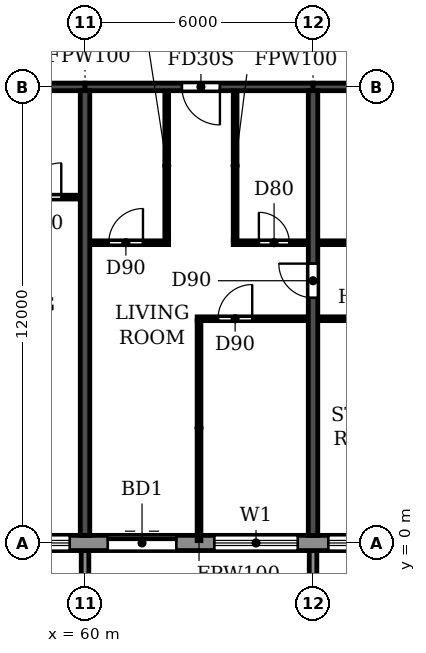
"""IFC4 building model, lengths in metres.
Left out: names, types, materials, properties, quantities, classifications, styles, units other than length and angle.
Written with IfcOpenShell. Run it as: python <this file> out.ifc"""

import sys

from ifc_helpers import new_model, si_unit, direction, frame, frame_2d, origin, place, context, subcontext, project, spatial, polyline, rectangle, outline, extrude, source, transform, mapped, element, fill, save


model = new_model("IFC4")
c1 = context("Model", 3, precision=1e-05, world=origin(), true_north=direction((0.0, 1.0)))
c2 = subcontext(c1, "Body", "Model", "MODEL_VIEW")
j1 = project(units=[si_unit("LENGTHUNIT", "METRE"), si_unit("PLANEANGLEUNIT", "RADIAN")], contexts=[c1])
p1 = place(None, origin())
s1 = spatial("IfcSite", under=j1, at=p1, CompositionType="ELEMENT")
p2 = place(p1, origin())
s2 = spatial("IfcBuilding", under=s1, at=p2, CompositionType="ELEMENT")
p3 = place(p2, frame((0.0, 0.0, 181.8)))
s3 = spatial("IfcBuildingStorey", under=s2, at=p3, CompositionType="ELEMENT", Elevation=181.8)
p4 = place(p3, frame((60.0, 0.2, 0.0), z_axis=(0.0, 0.0, 1.0), x_axis=(0.0, 1.0, 0.0)))
e1 = element("IfcWall", 1, at=p4, inside=s3, PredefinedType="SHEAR", context=c2, shape_type="SweptSolid", body=[
    extrude(rectangle(XDim=11.7, YDim=0.25, at=frame_2d((5.85, 0.0))), origin(), (0.0, 0.0, 1.0), 3.08),
])
p5 = place(p3, frame((66.0, 0.2, 0.0), z_axis=(0.0, 0.0, 1.0), x_axis=(0.0, 1.0, 0.0)))
e2 = element("IfcWall", 2, at=p5, inside=s3, PredefinedType="SHEAR", context=c2, shape_type="SweptSolid", body=[
    extrude(rectangle(XDim=11.7, YDim=0.25, at=frame_2d((5.85, 0.0))), origin(), (0.0, 0.0, 1.0), 3.08),
])
p6 = place(p5, frame((6.25, 0.0, 0.0)))
e3 = element("IfcOpeningElement", 3, at=p6, cuts=e2, PredefinedType="OPENING", context=c2, shape_type="SweptSolid", body=[
    extrude(rectangle(XDim=0.9, YDim=2.1, at=frame_2d((0.45, 1.05))), frame((0.0, 0.135, 0.0), z_axis=(0.0, -1.0, 0.0), x_axis=(1.0, 0.0, 0.0)), (0.0, 0.0, 1.0), 0.27),
])
p7 = place(p3, frame((54.0, 12.0, 0.0), z_axis=(0.0, 0.0, 1.0), x_axis=(1.0, 0.0, 0.0)))
e4 = element("IfcWall", 4, at=p7, inside=s3, PredefinedType="SHEAR", context=c2, shape_type="SweptSolid", body=[
    extrude(rectangle(XDim=6.0, YDim=0.2, at=frame_2d((3.0, 0.0))), origin(), (0.0, 0.0, 1.0), 2.48),
])
p8 = place(p7, frame((2.45, 0.0, 0.0)))
e5 = element("IfcOpeningElement", 5, at=p8, cuts=e4, PredefinedType="OPENING", context=c2, shape_type="SweptSolid", body=[
    extrude(rectangle(XDim=1.0, YDim=2.1, at=frame_2d((0.5, 1.05))), frame((0.0, 0.11, 0.0), z_axis=(0.0, -1.0, 0.0), x_axis=(1.0, 0.0, 0.0)), (0.0, 0.0, 1.0), 0.22),
])
p9 = place(p3, frame((60.0, 12.0, 0.0), z_axis=(0.0, 0.0, 1.0), x_axis=(1.0, 0.0, 0.0)))
e6 = element("IfcWall", 6, at=p9, inside=s3, PredefinedType="SHEAR", context=c2, shape_type="SweptSolid", body=[
    extrude(rectangle(XDim=6.0, YDim=0.2, at=frame_2d((3.0, 0.0))), origin(), (0.0, 0.0, 1.0), 2.48),
])
p10 = place(p9, frame((2.55, 0.0, 0.0)))
e7 = element("IfcOpeningElement", 7, at=p10, cuts=e6, PredefinedType="OPENING", context=c2, shape_type="SweptSolid", body=[
    extrude(rectangle(XDim=1.0, YDim=2.1, at=frame_2d((0.5, 1.05))), frame((0.0, 0.11, 0.0), z_axis=(0.0, -1.0, 0.0), x_axis=(1.0, 0.0, 0.0)), (0.0, 0.0, 1.0), 0.22),
])
p11 = place(p3, frame((66.0, 12.0, 0.0), z_axis=(0.0, 0.0, 1.0), x_axis=(1.0, 0.0, 0.0)))
e8 = element("IfcWall", 8, at=p11, inside=s3, PredefinedType="SHEAR", context=c2, shape_type="SweptSolid", body=[
    extrude(rectangle(XDim=6.0, YDim=0.2, at=frame_2d((3.0, 0.0))), origin(), (0.0, 0.0, 1.0), 2.48),
])
p12 = place(p3, frame((22.683, 0.0, 0.0), z_axis=(0.0, 0.0, 1.0), x_axis=(1.0, 0.0, 0.0)))
e9 = element("IfcWall", 9, at=p12, inside=s3, PredefinedType="STANDARD", context=c2, shape_type="SweptSolid", body=[
    extrude(rectangle(XDim=56.634, YDim=0.4, at=frame_2d((28.317, 0.0))), origin(), (0.0, 0.0, 1.0), 3.08),
])
p13 = place(p12, frame((1.717, 0.0, 0.9)))
e10 = element("IfcOpeningElement", 10, at=p13, cuts=e9, PredefinedType="OPENING", context=c2, shape_type="SweptSolid", body=[
    extrude(rectangle(XDim=2.2, YDim=1.5, at=frame_2d((1.1, 0.75))), frame((0.0, 0.21, 0.0), z_axis=(0.0, -1.0, 0.0), x_axis=(1.0, 0.0, 0.0)), (0.0, 0.0, 1.0), 0.42),
])
p14 = place(p12, frame((4.917, 0.0, 0.0)))
e11 = element("IfcOpeningElement", 11, at=p14, cuts=e9, PredefinedType="OPENING", context=c2, shape_type="SweptSolid", body=[
    extrude(rectangle(XDim=1.8, YDim=2.4, at=frame_2d((0.9, 1.2))), frame((0.0, 0.21, 0.0), z_axis=(0.0, -1.0, 0.0), x_axis=(1.0, 0.0, 0.0)), (0.0, 0.0, 1.0), 0.42),
])
p15 = place(p12, frame((7.717, 0.0, 0.9)))
e12 = element("IfcOpeningElement", 12, at=p15, cuts=e9, PredefinedType="OPENING", context=c2, shape_type="SweptSolid", body=[
    extrude(rectangle(XDim=2.2, YDim=1.5, at=frame_2d((1.1, 0.75))), frame((0.0, 0.21, 0.0), z_axis=(0.0, -1.0, 0.0), x_axis=(1.0, 0.0, 0.0)), (0.0, 0.0, 1.0), 0.42),
])
p16 = place(p12, frame((10.717, 0.0, 0.9)))
e13 = element("IfcOpeningElement", 13, at=p16, cuts=e9, PredefinedType="OPENING", context=c2, shape_type="SweptSolid", body=[
    extrude(rectangle(XDim=2.2, YDim=1.5, at=frame_2d((1.1, 0.75))), frame((0.0, 0.21, 0.0), z_axis=(0.0, -1.0, 0.0), x_axis=(1.0, 0.0, 0.0)), (0.0, 0.0, 1.0), 0.42),
])
p17 = place(p12, frame((13.717, 0.0, 0.9)))
e14 = element("IfcOpeningElement", 14, at=p17, cuts=e9, PredefinedType="OPENING", context=c2, shape_type="SweptSolid", body=[
    extrude(rectangle(XDim=2.2, YDim=1.5, at=frame_2d((1.1, 0.75))), frame((0.0, 0.21, 0.0), z_axis=(0.0, -1.0, 0.0), x_axis=(1.0, 0.0, 0.0)), (0.0, 0.0, 1.0), 0.42),
])
p18 = place(p12, frame((16.717, 0.0, 0.9)))
e15 = element("IfcOpeningElement", 15, at=p18, cuts=e9, PredefinedType="OPENING", context=c2, shape_type="SweptSolid", body=[
    extrude(rectangle(XDim=2.2, YDim=1.5, at=frame_2d((1.1, 0.75))), frame((0.0, 0.21, 0.0), z_axis=(0.0, -1.0, 0.0), x_axis=(1.0, 0.0, 0.0)), (0.0, 0.0, 1.0), 0.42),
])
p19 = place(p12, frame((19.717, 0.0, 0.9)))
e16 = element("IfcOpeningElement", 16, at=p19, cuts=e9, PredefinedType="OPENING", context=c2, shape_type="SweptSolid", body=[
    extrude(rectangle(XDim=2.2, YDim=1.5, at=frame_2d((1.1, 0.75))), frame((0.0, 0.21, 0.0), z_axis=(0.0, -1.0, 0.0), x_axis=(1.0, 0.0, 0.0)), (0.0, 0.0, 1.0), 0.42),
])
p20 = place(p12, frame((22.717, 0.0, 0.9)))
e17 = element("IfcOpeningElement", 17, at=p20, cuts=e9, PredefinedType="OPENING", context=c2, shape_type="SweptSolid", body=[
    extrude(rectangle(XDim=2.2, YDim=1.5, at=frame_2d((1.1, 0.75))), frame((0.0, 0.21, 0.0), z_axis=(0.0, -1.0, 0.0), x_axis=(1.0, 0.0, 0.0)), (0.0, 0.0, 1.0), 0.42),
])
p21 = place(p12, frame((25.717, 0.0, 0.9)))
e18 = element("IfcOpeningElement", 18, at=p21, cuts=e9, PredefinedType="OPENING", context=c2, shape_type="SweptSolid", body=[
    extrude(rectangle(XDim=2.2, YDim=1.5, at=frame_2d((1.1, 0.75))), frame((0.0, 0.21, 0.0), z_axis=(0.0, -1.0, 0.0), x_axis=(1.0, 0.0, 0.0)), (0.0, 0.0, 1.0), 0.42),
])
p22 = place(p12, frame((28.717, 0.0, 0.9)))
e19 = element("IfcOpeningElement", 19, at=p22, cuts=e9, PredefinedType="OPENING", context=c2, shape_type="SweptSolid", body=[
    extrude(rectangle(XDim=2.2, YDim=1.5, at=frame_2d((1.1, 0.75))), frame((0.0, 0.21, 0.0), z_axis=(0.0, -1.0, 0.0), x_axis=(1.0, 0.0, 0.0)), (0.0, 0.0, 1.0), 0.42),
])
p23 = place(p12, frame((31.717, 0.0, 0.9)))
e20 = element("IfcOpeningElement", 20, at=p23, cuts=e9, PredefinedType="OPENING", context=c2, shape_type="SweptSolid", body=[
    extrude(rectangle(XDim=2.2, YDim=1.5, at=frame_2d((1.1, 0.75))), frame((0.0, 0.21, 0.0), z_axis=(0.0, -1.0, 0.0), x_axis=(1.0, 0.0, 0.0)), (0.0, 0.0, 1.0), 0.42),
])
p24 = place(p12, frame((34.717, 0.0, 0.9)))
e21 = element("IfcOpeningElement", 21, at=p24, cuts=e9, PredefinedType="OPENING", context=c2, shape_type="SweptSolid", body=[
    extrude(rectangle(XDim=2.2, YDim=1.5, at=frame_2d((1.1, 0.75))), frame((0.0, 0.21, 0.0), z_axis=(0.0, -1.0, 0.0), x_axis=(1.0, 0.0, 0.0)), (0.0, 0.0, 1.0), 0.42),
])
p25 = place(p12, frame((37.917, 0.0, 0.0)))
e22 = element("IfcOpeningElement", 22, at=p25, cuts=e9, PredefinedType="OPENING", context=c2, shape_type="SweptSolid", body=[
    extrude(rectangle(XDim=1.8, YDim=2.4, at=frame_2d((0.9, 1.2))), frame((0.0, 0.21, 0.0), z_axis=(0.0, -1.0, 0.0), x_axis=(1.0, 0.0, 0.0)), (0.0, 0.0, 1.0), 0.42),
])
p26 = place(p12, frame((40.717, 0.0, 0.9)))
e23 = element("IfcOpeningElement", 23, at=p26, cuts=e9, PredefinedType="OPENING", context=c2, shape_type="SweptSolid", body=[
    extrude(rectangle(XDim=2.2, YDim=1.5, at=frame_2d((1.1, 0.75))), frame((0.0, 0.21, 0.0), z_axis=(0.0, -1.0, 0.0), x_axis=(1.0, 0.0, 0.0)), (0.0, 0.0, 1.0), 0.42),
])
p27 = place(p12, frame((43.717, 0.0, 0.9)))
e24 = element("IfcOpeningElement", 24, at=p27, cuts=e9, PredefinedType="OPENING", context=c2, shape_type="SweptSolid", body=[
    extrude(rectangle(XDim=2.2, YDim=1.5, at=frame_2d((1.1, 0.75))), frame((0.0, 0.21, 0.0), z_axis=(0.0, -1.0, 0.0), x_axis=(1.0, 0.0, 0.0)), (0.0, 0.0, 1.0), 0.42),
])
p28 = place(p12, frame((46.717, 0.0, 0.9)))
e25 = element("IfcOpeningElement", 25, at=p28, cuts=e9, PredefinedType="OPENING", context=c2, shape_type="SweptSolid", body=[
    extrude(rectangle(XDim=2.2, YDim=1.5, at=frame_2d((1.1, 0.75))), frame((0.0, 0.21, 0.0), z_axis=(0.0, -1.0, 0.0), x_axis=(1.0, 0.0, 0.0)), (0.0, 0.0, 1.0), 0.42),
])
p29 = place(p12, frame((49.917, 0.0, 0.0)))
e26 = element("IfcOpeningElement", 26, at=p29, cuts=e9, PredefinedType="OPENING", context=c2, shape_type="SweptSolid", body=[
    extrude(rectangle(XDim=1.8, YDim=2.4, at=frame_2d((0.9, 1.2))), frame((0.0, 0.21, 0.0), z_axis=(0.0, -1.0, 0.0), x_axis=(1.0, 0.0, 0.0)), (0.0, 0.0, 1.0), 0.42),
])
p30 = place(p12, frame((52.717, 0.0, 0.9)))
e27 = element("IfcOpeningElement", 27, at=p30, cuts=e9, PredefinedType="OPENING", context=c2, shape_type="SweptSolid", body=[
    extrude(rectangle(XDim=2.2, YDim=1.5, at=frame_2d((1.1, 0.75))), frame((0.0, 0.21, 0.0), z_axis=(0.0, -1.0, 0.0), x_axis=(1.0, 0.0, 0.0)), (0.0, 0.0, 1.0), 0.42),
])
m1 = source(origin(), c2, "Body", "SweptSolid", [
    extrude(outline(polyline([(0.0, 0.0), (0.2, 0.0), (0.2, 1.65), (0.0, 1.65), (0.0, 0.0)])), origin(), (0.0, 0.0, 1.0), 3.1),
])
for number, where in (
    (28, (59.9, -1.85, 0.0)),
    (29, (65.9, -1.85, 0.0)),
):
    element("IfcWall", number, at=place(p3, frame(where)), inside=s3, PredefinedType="STANDARD", context=c2, shape_type="MappedRepresentation", body=[
        mapped(m1, transform((0.0, 0.0, 0.0))),
    ])
p31 = place(p3, frame((62.95, 5.9, 0.0), z_axis=(0.0, 0.0, 1.0), x_axis=(1.0, 0.0, 0.0)))
e30 = element("IfcWall", 30, at=p31, inside=s3, PredefinedType="PARTITIONING", context=c2, shape_type="SweptSolid", body=[
    extrude(rectangle(XDim=2.915, YDim=0.1, at=frame_2d((1.458, 0.0))), origin(), (0.0, 0.0, 1.0), 3.08),
])
p32 = place(p31, frame((0.55, 0.0, 0.0)))
e31 = element("IfcOpeningElement", 31, at=p32, cuts=e30, PredefinedType="OPENING", context=c2, shape_type="SweptSolid", body=[
    extrude(rectangle(XDim=0.9, YDim=2.1, at=frame_2d((0.45, 1.05))), frame((0.0, 0.06, 0.0), z_axis=(0.0, -1.0, 0.0), x_axis=(1.0, 0.0, 0.0)), (0.0, 0.0, 1.0), 0.12),
])
p33 = place(p3, frame((66.135, 5.9, 0.0), z_axis=(0.0, 0.0, 1.0), x_axis=(1.0, 0.0, 0.0)))
e32 = element("IfcWall", 32, at=p33, inside=s3, PredefinedType="PARTITIONING", context=c2, shape_type="SweptSolid", body=[
    extrude(rectangle(XDim=2.765, YDim=0.1, at=frame_2d((1.382, 0.0))), origin(), (0.0, 0.0, 1.0), 3.08),
])
p34 = place(p33, frame((1.465, 0.0, 0.0)))
e33 = element("IfcOpeningElement", 33, at=p34, cuts=e32, PredefinedType="OPENING", context=c2, shape_type="SweptSolid", body=[
    extrude(rectangle(XDim=0.9, YDim=2.1, at=frame_2d((0.45, 1.05))), frame((0.0, 0.06, 0.0), z_axis=(0.0, -1.0, 0.0), x_axis=(1.0, 0.0, 0.0)), (0.0, 0.0, 1.0), 0.12),
])
p35 = place(p3, frame((60.135, 7.9, 0.0), z_axis=(0.0, 0.0, 1.0), x_axis=(1.0, 0.0, 0.0)))
e34 = element("IfcWall", 34, at=p35, inside=s3, PredefinedType="PARTITIONING", context=c2, shape_type="SweptSolid", body=[
    extrude(rectangle(XDim=2.065, YDim=0.1, at=frame_2d((1.032, 0.0))), origin(), (0.0, 0.0, 1.0), 3.08),
])
p36 = place(p35, frame((0.49, 0.0, 0.0)))
e35 = element("IfcOpeningElement", 35, at=p36, cuts=e34, PredefinedType="OPENING", context=c2, shape_type="SweptSolid", body=[
    extrude(rectangle(XDim=0.9, YDim=2.1, at=frame_2d((0.45, 1.05))), frame((0.0, 0.06, 0.0), z_axis=(0.0, -1.0, 0.0), x_axis=(1.0, 0.0, 0.0)), (0.0, 0.0, 1.0), 0.12),
])
p37 = place(p3, frame((63.9, 7.9, 0.0), z_axis=(0.0, 0.0, 1.0), x_axis=(1.0, 0.0, 0.0)))
e36 = element("IfcWall", 36, at=p37, inside=s3, PredefinedType="PARTITIONING", context=c2, shape_type="SweptSolid", body=[
    extrude(rectangle(XDim=1.965, YDim=0.1, at=frame_2d((0.982, 0.0))), origin(), (0.0, 0.0, 1.0), 3.08),
])
p38 = place(p37, frame((0.675, 0.0, 0.0)))
e37 = element("IfcOpeningElement", 37, at=p38, cuts=e36, PredefinedType="OPENING", context=c2, shape_type="SweptSolid", body=[
    extrude(rectangle(XDim=0.8, YDim=2.1, at=frame_2d((0.4, 1.05))), frame((0.0, 0.06, 0.0), z_axis=(0.0, -1.0, 0.0), x_axis=(1.0, 0.0, 0.0)), (0.0, 0.0, 1.0), 0.12),
])
p39 = place(p3, frame((66.135, 7.9, 0.0), z_axis=(0.0, 0.0, 1.0), x_axis=(1.0, 0.0, 0.0)))
e38 = element("IfcWall", 38, at=p39, inside=s3, PredefinedType="PARTITIONING", context=c2, shape_type="SweptSolid", body=[
    extrude(rectangle(XDim=2.965, YDim=0.1, at=frame_2d((1.482, 0.0))), origin(), (0.0, 0.0, 1.0), 3.08),
])
p40 = place(p39, frame((0.965, 0.0, 0.0)))
e39 = element("IfcOpeningElement", 39, at=p40, cuts=e38, PredefinedType="OPENING", context=c2, shape_type="SweptSolid", body=[
    extrude(rectangle(XDim=0.8, YDim=2.1, at=frame_2d((0.4, 1.05))), frame((0.0, 0.06, 0.0), z_axis=(0.0, -1.0, 0.0), x_axis=(1.0, 0.0, 0.0)), (0.0, 0.0, 1.0), 0.12),
])
p41 = place(p3, frame((57.8, 9.1, 0.0), z_axis=(0.0, 0.0, 1.0), x_axis=(1.0, 0.0, 0.0)))
e40 = element("IfcWall", 40, at=p41, inside=s3, PredefinedType="PARTITIONING", context=c2, shape_type="SweptSolid", body=[
    extrude(rectangle(XDim=2.065, YDim=0.1, at=frame_2d((1.032, 0.0))), origin(), (0.0, 0.0, 1.0), 3.08),
])
p42 = place(p41, frame((0.675, 0.0, 0.0)))
e41 = element("IfcOpeningElement", 41, at=p42, cuts=e40, PredefinedType="OPENING", context=c2, shape_type="SweptSolid", body=[
    extrude(rectangle(XDim=0.9, YDim=2.1, at=frame_2d((0.45, 1.05))), frame((0.0, 0.06, 0.0), z_axis=(0.0, -1.0, 0.0), x_axis=(1.0, 0.0, 0.0)), (0.0, 0.0, 1.0), 0.12),
])
p43 = place(p3, frame((62.15, 7.95, 0.0), z_axis=(0.0, 0.0, 1.0), x_axis=(0.0, 1.0, 0.0)))
e42 = element("IfcWall", 42, at=p43, inside=s3, PredefinedType="PARTITIONING", context=c2, shape_type="SweptSolid", body=[
    extrude(rectangle(XDim=3.94, YDim=0.1, at=frame_2d((1.97, 0.0))), origin(), (0.0, 0.0, 1.0), 3.08),
])
p44 = place(p3, frame((63.0, 0.06, 0.0), z_axis=(0.0, 0.0, 1.0), x_axis=(0.0, 1.0, 0.0)))
e43 = element("IfcWall", 43, at=p44, inside=s3, PredefinedType="PARTITIONING", context=c2, shape_type="SweptSolid", body=[
    extrude(rectangle(XDim=5.79, YDim=0.1, at=frame_2d((2.895, 0.0))), origin(), (0.0, 0.0, 1.0), 3.08),
])
p45 = place(p3, frame((63.95, 7.95, 0.0), z_axis=(0.0, 0.0, 1.0), x_axis=(0.0, 1.0, 0.0)))
e44 = element("IfcWall", 44, at=p45, inside=s3, PredefinedType="PARTITIONING", context=c2, shape_type="SweptSolid", body=[
    extrude(rectangle(XDim=3.94, YDim=0.1, at=frame_2d((1.97, 0.0))), origin(), (0.0, 0.0, 1.0), 3.08),
])
p46 = place(p24, origin())
e45 = element("IfcWindow", 45, at=p46, inside=s3, PartitioningType="DOUBLE_PANEL_HORIZONTAL", PredefinedType="WINDOW", context=c2, shape_type="SweptSolid", body=[
    extrude(rectangle(XDim=2.2, YDim=1.5, at=frame_2d((1.1, 0.75))), frame((0.0, 0.03, 0.0), z_axis=(0.0, -1.0, 0.0), x_axis=(1.0, 0.0, 0.0)), (0.0, 0.0, 1.0), 0.06),
])
fill(e21, e45)
p47 = place(p25, origin())
e46 = element("IfcDoor", 46, at=p47, inside=s3, OperationType="DOUBLE_DOOR_SLIDING", PredefinedType="DOOR", context=c2, shape_type="SweptSolid", body=[
    extrude(rectangle(XDim=1.8, YDim=2.4, at=frame_2d((0.9, 1.2))), frame((0.0, 0.025, 0.0), z_axis=(0.0, -1.0, 0.0), x_axis=(1.0, 0.0, 0.0)), (0.0, 0.0, 1.0), 0.05),
])
fill(e22, e46)
p48 = place(p26, origin())
e47 = element("IfcWindow", 47, at=p48, inside=s3, PartitioningType="DOUBLE_PANEL_HORIZONTAL", PredefinedType="WINDOW", context=c2, shape_type="SweptSolid", body=[
    extrude(rectangle(XDim=2.2, YDim=1.5, at=frame_2d((1.1, 0.75))), frame((0.0, 0.03, 0.0), z_axis=(0.0, -1.0, 0.0), x_axis=(1.0, 0.0, 0.0)), (0.0, 0.0, 1.0), 0.06),
])
fill(e23, e47)
p49 = place(p27, origin())
e48 = element("IfcWindow", 48, at=p49, inside=s3, PartitioningType="DOUBLE_PANEL_HORIZONTAL", PredefinedType="WINDOW", context=c2, shape_type="SweptSolid", body=[
    extrude(rectangle(XDim=2.2, YDim=1.5, at=frame_2d((1.1, 0.75))), frame((0.0, 0.03, 0.0), z_axis=(0.0, -1.0, 0.0), x_axis=(1.0, 0.0, 0.0)), (0.0, 0.0, 1.0), 0.06),
])
fill(e24, e48)
p50 = place(p42, origin())
e49 = element("IfcDoor", 49, at=p50, inside=s3, OperationType="SINGLE_SWING_RIGHT", PredefinedType="DOOR", context=c2, shape_type="SweptSolid", body=[
    extrude(rectangle(XDim=0.9, YDim=2.1, at=frame_2d((0.45, 1.05))), frame((0.0, 0.025, 0.0), z_axis=(0.0, -1.0, 0.0), x_axis=(1.0, 0.0, 0.0)), (0.0, 0.0, 1.0), 0.05),
])
fill(e41, e49)
p51 = place(p36, origin())
e50 = element("IfcDoor", 50, at=p51, inside=s3, OperationType="SINGLE_SWING_RIGHT", PredefinedType="DOOR", context=c2, shape_type="SweptSolid", body=[
    extrude(rectangle(XDim=0.9, YDim=2.1, at=frame_2d((0.45, 1.05))), frame((0.0, 0.025, 0.0), z_axis=(0.0, -1.0, 0.0), x_axis=(1.0, 0.0, 0.0)), (0.0, 0.0, 1.0), 0.05),
])
fill(e35, e50)
p52 = place(p10, frame((1.0, 0.0, 0.0), z_axis=(0.0, 0.0, 1.0), x_axis=(-1.0, 0.0, 0.0)))
e51 = element("IfcDoor", 51, at=p52, inside=s3, OperationType="SINGLE_SWING_LEFT", PredefinedType="DOOR", context=c2, shape_type="SweptSolid", body=[
    extrude(rectangle(XDim=1.0, YDim=2.1, at=frame_2d((0.5, 1.05))), frame((0.0, 0.025, 0.0), z_axis=(0.0, -1.0, 0.0), x_axis=(1.0, 0.0, 0.0)), (0.0, 0.0, 1.0), 0.05),
])
fill(e7, e51)
p53 = place(p32, origin())
e52 = element("IfcDoor", 52, at=p53, inside=s3, OperationType="SINGLE_SWING_RIGHT", PredefinedType="DOOR", context=c2, shape_type="SweptSolid", body=[
    extrude(rectangle(XDim=0.9, YDim=2.1, at=frame_2d((0.45, 1.05))), frame((0.0, 0.025, 0.0), z_axis=(0.0, -1.0, 0.0), x_axis=(1.0, 0.0, 0.0)), (0.0, 0.0, 1.0), 0.05),
])
fill(e31, e52)
p54 = place(p38, origin())
e53 = element("IfcDoor", 53, at=p54, inside=s3, OperationType="SINGLE_SWING_LEFT", PredefinedType="DOOR", context=c2, shape_type="SweptSolid", body=[
    extrude(rectangle(XDim=0.8, YDim=2.1, at=frame_2d((0.4, 1.05))), frame((0.0, 0.025, 0.0), z_axis=(0.0, -1.0, 0.0), x_axis=(1.0, 0.0, 0.0)), (0.0, 0.0, 1.0), 0.05),
])
fill(e37, e53)
p55 = place(p6, origin())
e54 = element("IfcDoor", 54, at=p55, inside=s3, OperationType="SINGLE_SWING_RIGHT", PredefinedType="DOOR", context=c2, shape_type="SweptSolid", body=[
    extrude(rectangle(XDim=0.9, YDim=2.1, at=frame_2d((0.45, 1.05))), frame((0.0, 0.025, 0.0), z_axis=(0.0, -1.0, 0.0), x_axis=(1.0, 0.0, 0.0)), (0.0, 0.0, 1.0), 0.05),
])
fill(e3, e54)
save(model, sys.argv[1])
